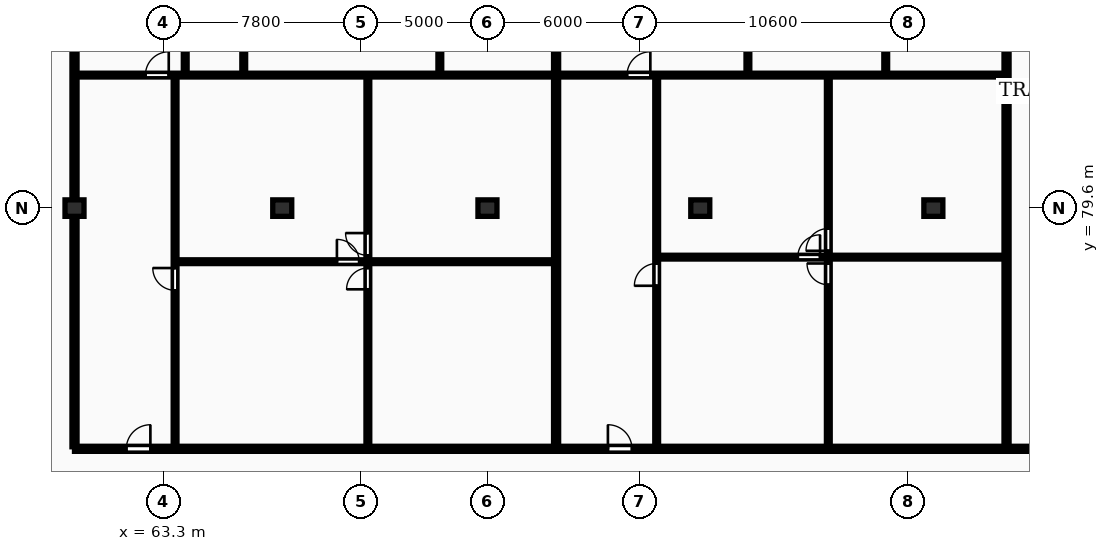
"""IFC4 building model, lengths in metres.
Left out: names, types, materials, properties, quantities, classifications, styles, units other than length and angle.
Written with IfcOpenShell. Run it as: python <this file> out.ifc"""

import sys

from ifc_helpers import new_model, si_unit, direction, frame, frame_2d, origin, origin_2d, place, context, subcontext, project, spatial, rectangle, extrude, element, fill, save


model = new_model("IFC4")
c1 = context("Model", 3, precision=1e-05, world=origin(), true_north=direction((0.0, 1.0)))
c2 = subcontext(c1, "Body", "Model", "MODEL_VIEW")
j1 = project(units=[si_unit("LENGTHUNIT", "METRE"), si_unit("PLANEANGLEUNIT", "RADIAN")], contexts=[c1])
p1 = place(None, origin())
s1 = spatial("IfcSite", under=j1, at=p1, CompositionType="ELEMENT")
p2 = place(p1, origin())
s2 = spatial("IfcBuilding", under=s1, at=p2, CompositionType="ELEMENT")
p3 = place(p2, frame((0.0, 0.0, 249.35)))
s3 = spatial("IfcBuildingStorey", under=s2, at=p3, CompositionType="ELEMENT", Elevation=249.35)
for number, where, z_axis, x_axis in (
    (1, (59.8, 79.6, 0.0), (0.0, 0.0, 1.0), (1.0, 0.0, 0.0)),
    (2, (68.0, 79.6, 0.0), (0.0, 0.0, 1.0), (1.0, 0.0, 0.0)),
    (3, (76.1, 79.6, 0.0), (0.0, 0.0, 1.0), (1.0, 0.0, 0.0)),
    (4, (84.5, 79.6, 0.0), (0.0, 0.0, 1.0), (1.0, 0.0, 0.0)),
    (5, (93.7, 79.6, 0.0), (0.0, 0.0, 1.0), (1.0, 0.0, 0.0)),
):
    element("IfcColumn", number, at=place(p3, frame(where, z_axis=z_axis, x_axis=x_axis)), inside=s3, PredefinedType="COLUMN", context=c2, shape_type="SweptSolid", body=[
        extrude(rectangle(XDim=0.75, YDim=0.65, at=origin_2d()), origin(), (0.0, 0.0, 1.0), 3.45),
    ])
p4 = place(p3, frame((59.8, 70.18, 0.0), z_axis=(0.0, 0.0, 1.0), x_axis=(0.0, 1.0, 0.0)))
e6 = element("IfcWall", 6, at=p4, inside=s3, PredefinedType="PARTITIONING", context=c2, shape_type="SweptSolid", body=[
    extrude(rectangle(XDim=24.32, YDim=0.2, at=frame_2d((12.16, 0.0))), origin(), (0.0, 0.0, 1.0), 2.477),
])
p5 = place(p3, frame((78.809, 70.18, 0.0), z_axis=(0.0, 0.0, 1.0), x_axis=(0.0, 1.0, 0.0)))
e7 = element("IfcWall", 7, at=p5, inside=s3, PredefinedType="PARTITIONING", context=c2, shape_type="SweptSolid", body=[
    extrude(rectangle(XDim=24.32, YDim=0.2, at=frame_2d((12.16, 0.0))), origin(), (0.0, 0.0, 1.0), 3.17),
])
p6 = place(p3, frame((71.379, 70.16, 0.0), z_axis=(0.0, 0.0, 1.0), x_axis=(0.0, 1.0, 0.0)))
e8 = element("IfcWall", 8, at=p6, inside=s3, PredefinedType="PARTITIONING", context=c2, shape_type="SweptSolid", body=[
    extrude(rectangle(XDim=14.65, YDim=0.15, at=frame_2d((7.325, 0.0))), origin(), (0.0, 0.0, 1.0), 3.17),
])
p7 = place(p6, frame((6.235, 0.0, 0.0)))
e9 = element("IfcOpeningElement", 9, at=p7, cuts=e8, PredefinedType="OPENING", context=c2, shape_type="SweptSolid", body=[
    extrude(rectangle(XDim=0.84, YDim=2.04, at=frame_2d((0.42, 1.02))), frame((0.0, 0.085, 0.0), z_axis=(0.0, -1.0, 0.0), x_axis=(1.0, 0.0, 0.0)), (0.0, 0.0, 1.0), 0.17),
])
p8 = place(p6, frame((7.575, 0.0, 0.0)))
e10 = element("IfcOpeningElement", 10, at=p8, cuts=e8, PredefinedType="OPENING", context=c2, shape_type="SweptSolid", body=[
    extrude(rectangle(XDim=0.88, YDim=2.06, at=frame_2d((0.44, 1.03))), frame((0.0, 0.085, 0.0), z_axis=(0.0, -1.0, 0.0), x_axis=(1.0, 0.0, 0.0)), (0.0, 0.0, 1.0), 0.17),
])
p9 = place(p3, frame((63.83, 77.485, 0.0), z_axis=(0.0, 0.0, 1.0), x_axis=(1.0, 0.0, 0.0)))
e11 = element("IfcWall", 11, at=p9, inside=s3, PredefinedType="PARTITIONING", context=c2, shape_type="SweptSolid", body=[
    extrude(rectangle(XDim=14.899, YDim=0.15, at=frame_2d((7.449, 0.0))), origin(), (0.0, 0.0, 1.0), 3.17),
])
p10 = place(p9, frame((6.327, 0.0, 0.0)))
e12 = element("IfcOpeningElement", 12, at=p10, cuts=e11, PredefinedType="OPENING", context=c2, shape_type="SweptSolid", body=[
    extrude(rectangle(XDim=0.88, YDim=2.06, at=frame_2d((0.44, 1.03))), frame((0.0, 0.085, 0.0), z_axis=(0.0, -1.0, 0.0), x_axis=(1.0, 0.0, 0.0)), (0.0, 0.0, 1.0), 0.17),
])
p11 = place(p3, frame((63.77, 70.16, 0.0), z_axis=(0.0, 0.0, 1.0), x_axis=(0.0, 1.0, 0.0)))
e13 = element("IfcWall", 13, at=p11, inside=s3, PredefinedType="PARTITIONING", context=c2, shape_type="SweptSolid", body=[
    extrude(rectangle(XDim=14.65, YDim=0.15, at=frame_2d((7.325, 0.0))), origin(), (0.0, 0.0, 1.0), 3.17),
])
p12 = place(p11, frame((6.195, 0.0, 0.0)))
e14 = element("IfcOpeningElement", 14, at=p12, cuts=e13, PredefinedType="OPENING", context=c2, shape_type="SweptSolid", body=[
    extrude(rectangle(XDim=0.88, YDim=2.06, at=frame_2d((0.44, 1.03))), frame((0.0, 0.085, 0.0), z_axis=(0.0, -1.0, 0.0), x_axis=(1.0, 0.0, 0.0)), (0.0, 0.0, 1.0), 0.17),
])
p13 = place(p3, frame((66.48, 84.89, 0.0), z_axis=(0.0, 0.0, 1.0), x_axis=(0.0, 1.0, 0.0)))
e15 = element("IfcWall", 15, at=p13, inside=s3, PredefinedType="PARTITIONING", context=c2, shape_type="SweptSolid", body=[
    extrude(rectangle(XDim=2.58, YDim=0.15, at=frame_2d((1.29, 0.0))), origin(), (0.0, 0.0, 1.0), 3.17),
])
p14 = place(p3, frame((64.17, 84.89, 0.0), z_axis=(0.0, 0.0, 1.0), x_axis=(0.0, 1.0, 0.0)))
e16 = element("IfcWall", 16, at=p14, inside=s3, PredefinedType="PARTITIONING", context=c2, shape_type="SweptSolid", body=[
    extrude(rectangle(XDim=9.61, YDim=0.15, at=frame_2d((4.805, 0.0))), origin(), (0.0, 0.0, 1.0), 3.17),
])
p15 = place(p14, frame((3.82, 0.0, 0.0)))
e17 = element("IfcOpeningElement", 17, at=p15, cuts=e16, PredefinedType="OPENING", context=c2, shape_type="SweptSolid", body=[
    extrude(rectangle(XDim=0.92, YDim=2.08, at=frame_2d((0.46, 1.04))), frame((0.0, 0.085, 0.0), z_axis=(0.0, -1.0, 0.0), x_axis=(1.0, 0.0, 0.0)), (0.0, 0.0, 1.0), 0.17),
])
p16 = place(p3, frame((74.22, 84.89, 0.0), z_axis=(0.0, 0.0, 1.0), x_axis=(0.0, 1.0, 0.0)))
e18 = element("IfcWall", 18, at=p16, inside=s3, PredefinedType="PARTITIONING", context=c2, shape_type="SweptSolid", body=[
    extrude(rectangle(XDim=2.58, YDim=0.15, at=frame_2d((1.29, 0.0))), origin(), (0.0, 0.0, 1.0), 3.17),
])
p17 = place(p3, frame((59.88, 84.85, 0.0), z_axis=(0.0, 0.0, 1.0), x_axis=(1.0, 0.0, 0.0)))
e19 = element("IfcWall", 19, at=p17, inside=s3, PredefinedType="PARTITIONING", context=c2, shape_type="SweptSolid", body=[
    extrude(rectangle(XDim=18.849, YDim=0.15, at=frame_2d((9.425, 0.0))), origin(), (0.0, 0.0, 1.0), 3.17),
])
p18 = place(p17, frame((2.72, 0.0, 0.0)))
e20 = element("IfcOpeningElement", 20, at=p18, cuts=e19, PredefinedType="OPENING", context=c2, shape_type="SweptSolid", body=[
    extrude(rectangle(XDim=0.92, YDim=2.08, at=frame_2d((0.46, 1.04))), frame((0.0, 0.085, 0.0), z_axis=(0.0, -1.0, 0.0), x_axis=(1.0, 0.0, 0.0)), (0.0, 0.0, 1.0), 0.17),
])
p19 = place(p3, frame((96.589, 70.18, 0.0), z_axis=(0.0, 0.0, 1.0), x_axis=(0.0, 1.0, 0.0)))
e21 = element("IfcWall", 21, at=p19, inside=s3, PredefinedType="PARTITIONING", context=c2, shape_type="SweptSolid", body=[
    extrude(rectangle(XDim=24.32, YDim=0.2, at=frame_2d((12.16, 0.0))), origin(), (0.0, 0.0, 1.0), 3.17),
])
p20 = place(p3, frame((89.554, 70.16, 0.0), z_axis=(0.0, 0.0, 1.0), x_axis=(0.0, 1.0, 0.0)))
e22 = element("IfcWall", 22, at=p20, inside=s3, PredefinedType="PARTITIONING", context=c2, shape_type="SweptSolid", body=[
    extrude(rectangle(XDim=14.65, YDim=0.15, at=frame_2d((7.325, 0.0))), origin(), (0.0, 0.0, 1.0), 3.17),
])
p21 = place(p20, frame((6.415, 0.0, 0.0)))
e23 = element("IfcOpeningElement", 23, at=p21, cuts=e22, PredefinedType="OPENING", context=c2, shape_type="SweptSolid", body=[
    extrude(rectangle(XDim=0.84, YDim=2.04, at=frame_2d((0.42, 1.02))), frame((0.0, 0.085, 0.0), z_axis=(0.0, -1.0, 0.0), x_axis=(1.0, 0.0, 0.0)), (0.0, 0.0, 1.0), 0.17),
])
p22 = place(p20, frame((7.755, 0.0, 0.0)))
e24 = element("IfcOpeningElement", 24, at=p22, cuts=e22, PredefinedType="OPENING", context=c2, shape_type="SweptSolid", body=[
    extrude(rectangle(XDim=0.88, YDim=2.06, at=frame_2d((0.44, 1.03))), frame((0.0, 0.085, 0.0), z_axis=(0.0, -1.0, 0.0), x_axis=(1.0, 0.0, 0.0)), (0.0, 0.0, 1.0), 0.17),
])
p23 = place(p3, frame((82.839, 77.665, 0.0), z_axis=(0.0, 0.0, 1.0), x_axis=(1.0, 0.0, 0.0)))
e25 = element("IfcWall", 25, at=p23, inside=s3, PredefinedType="PARTITIONING", context=c2, shape_type="SweptSolid", body=[
    extrude(rectangle(XDim=13.669, YDim=0.15, at=frame_2d((6.835, 0.0))), origin(), (0.0, 0.0, 1.0), 3.17),
])
p24 = place(p23, frame((5.51, 0.0, 0.0)))
e26 = element("IfcOpeningElement", 26, at=p24, cuts=e25, PredefinedType="OPENING", context=c2, shape_type="SweptSolid", body=[
    extrude(rectangle(XDim=0.88, YDim=2.06, at=frame_2d((0.44, 1.03))), frame((0.0, 0.085, 0.0), z_axis=(0.0, -1.0, 0.0), x_axis=(1.0, 0.0, 0.0)), (0.0, 0.0, 1.0), 0.17),
])
p25 = place(p3, frame((82.779, 70.16, 0.0), z_axis=(0.0, 0.0, 1.0), x_axis=(0.0, 1.0, 0.0)))
e27 = element("IfcWall", 27, at=p25, inside=s3, PredefinedType="PARTITIONING", context=c2, shape_type="SweptSolid", body=[
    extrude(rectangle(XDim=14.65, YDim=0.15, at=frame_2d((7.325, 0.0))), origin(), (0.0, 0.0, 1.0), 3.17),
])
p26 = place(p25, frame((6.375, 0.0, 0.0)))
e28 = element("IfcOpeningElement", 28, at=p26, cuts=e27, PredefinedType="OPENING", context=c2, shape_type="SweptSolid", body=[
    extrude(rectangle(XDim=0.88, YDim=2.06, at=frame_2d((0.44, 1.03))), frame((0.0, 0.085, 0.0), z_axis=(0.0, -1.0, 0.0), x_axis=(1.0, 0.0, 0.0)), (0.0, 0.0, 1.0), 0.17),
])
p27 = place(p3, frame((86.38, 84.89, 0.0), z_axis=(0.0, 0.0, 1.0), x_axis=(0.0, 1.0, 0.0)))
e29 = element("IfcWall", 29, at=p27, inside=s3, PredefinedType="PARTITIONING", context=c2, shape_type="SweptSolid", body=[
    extrude(rectangle(XDim=9.61, YDim=0.15, at=frame_2d((4.805, 0.0))), origin(), (0.0, 0.0, 1.0), 3.17),
])
p28 = place(p27, frame((3.82, 0.0, 0.0)))
e30 = element("IfcOpeningElement", 30, at=p28, cuts=e29, PredefinedType="OPENING", context=c2, shape_type="SweptSolid", body=[
    extrude(rectangle(XDim=0.92, YDim=2.08, at=frame_2d((0.46, 1.04))), frame((0.0, 0.085, 0.0), z_axis=(0.0, -1.0, 0.0), x_axis=(1.0, 0.0, 0.0)), (0.0, 0.0, 1.0), 0.17),
])
p29 = place(p3, frame((91.82, 84.89, 0.0), z_axis=(0.0, 0.0, 1.0), x_axis=(0.0, 1.0, 0.0)))
e31 = element("IfcWall", 31, at=p29, inside=s3, PredefinedType="PARTITIONING", context=c2, shape_type="SweptSolid", body=[
    extrude(rectangle(XDim=2.47, YDim=0.15, at=frame_2d((1.235, 0.0))), origin(), (0.0, 0.0, 1.0), 3.17),
])
p30 = place(p3, frame((78.889, 84.85, 0.0), z_axis=(0.0, 0.0, 1.0), x_axis=(1.0, 0.0, 0.0)))
e32 = element("IfcWall", 32, at=p30, inside=s3, PredefinedType="PARTITIONING", context=c2, shape_type="SweptSolid", body=[
    extrude(rectangle(XDim=17.619, YDim=0.15, at=frame_2d((8.81, 0.0))), origin(), (0.0, 0.0, 1.0), 3.17),
])
p31 = place(p30, frame((2.72, 0.0, 0.0)))
e33 = element("IfcOpeningElement", 33, at=p31, cuts=e32, PredefinedType="OPENING", context=c2, shape_type="SweptSolid", body=[
    extrude(rectangle(XDim=0.92, YDim=2.08, at=frame_2d((0.46, 1.04))), frame((0.0, 0.085, 0.0), z_axis=(0.0, -1.0, 0.0), x_axis=(1.0, 0.0, 0.0)), (0.0, 0.0, 1.0), 0.17),
])
p32 = place(p3, frame((59.8, 70.1, 0.0), z_axis=(0.0, 0.0, 1.0), x_axis=(1.0, 0.0, 0.0)))
e34 = element("IfcWall", 34, at=p32, inside=s3, PredefinedType="PARTITIONING", context=c2, shape_type="SweptSolid", body=[
    extrude(rectangle(XDim=68.6, YDim=0.2, at=frame_2d((34.3, 0.0))), origin(), (0.0, 0.0, 1.0), 3.17),
])
p33 = place(p32, frame((2.045, 0.0, 0.0)))
e35 = element("IfcOpeningElement", 35, at=p33, cuts=e34, PredefinedType="OPENING", context=c2, shape_type="SweptSolid", body=[
    extrude(rectangle(XDim=0.95, YDim=2.15, at=frame_2d((0.475, 1.075))), frame((0.0, 0.11, 0.0), z_axis=(0.0, -1.0, 0.0), x_axis=(1.0, 0.0, 0.0)), (0.0, 0.0, 1.0), 0.22),
])
p34 = place(p32, frame((21.054, 0.0, 0.0)))
e36 = element("IfcOpeningElement", 36, at=p34, cuts=e34, PredefinedType="OPENING", context=c2, shape_type="SweptSolid", body=[
    extrude(rectangle(XDim=0.95, YDim=2.15, at=frame_2d((0.475, 1.075))), frame((0.0, 0.11, 0.0), z_axis=(0.0, -1.0, 0.0), x_axis=(1.0, 0.0, 0.0)), (0.0, 0.0, 1.0), 0.22),
])
p35 = place(p32, frame((43.434, 0.0, 0.0)))
e37 = element("IfcOpeningElement", 37, at=p35, cuts=e34, PredefinedType="OPENING", context=c2, shape_type="SweptSolid", body=[
    extrude(rectangle(XDim=1.22, YDim=2.18, at=frame_2d((0.61, 1.09))), frame((0.0, 0.11, 0.0), z_axis=(0.0, -1.0, 0.0), x_axis=(1.0, 0.0, 0.0)), (0.0, 0.0, 1.0), 0.22),
])
p36 = place(p32, frame((59.455, 0.0, 0.0)))
e38 = element("IfcOpeningElement", 38, at=p36, cuts=e34, PredefinedType="OPENING", context=c2, shape_type="SweptSolid", body=[
    extrude(rectangle(XDim=1.22, YDim=2.18, at=frame_2d((0.61, 1.09))), frame((0.0, 0.11, 0.0), z_axis=(0.0, -1.0, 0.0), x_axis=(1.0, 0.0, 0.0)), (0.0, 0.0, 1.0), 0.22),
])
p37 = place(p7, origin())
e39 = element("IfcDoor", 39, at=p37, inside=s3, OperationType="SINGLE_SWING_LEFT", PredefinedType="DOOR", context=c2, shape_type="SweptSolid", body=[
    extrude(rectangle(XDim=0.84, YDim=2.04, at=frame_2d((0.42, 1.02))), frame((0.0, 0.025, 0.0), z_axis=(0.0, -1.0, 0.0), x_axis=(1.0, 0.0, 0.0)), (0.0, 0.0, 1.0), 0.05),
])
fill(e9, e39)
p38 = place(p8, origin())
e40 = element("IfcDoor", 40, at=p38, inside=s3, OperationType="SINGLE_SWING_RIGHT", PredefinedType="DOOR", context=c2, shape_type="SweptSolid", body=[
    extrude(rectangle(XDim=0.88, YDim=2.06, at=frame_2d((0.44, 1.03))), frame((0.0, 0.025, 0.0), z_axis=(0.0, -1.0, 0.0), x_axis=(1.0, 0.0, 0.0)), (0.0, 0.0, 1.0), 0.05),
])
fill(e10, e40)
p39 = place(p10, origin())
e41 = element("IfcDoor", 41, at=p39, inside=s3, OperationType="SINGLE_SWING_LEFT", PredefinedType="DOOR", context=c2, shape_type="SweptSolid", body=[
    extrude(rectangle(XDim=0.88, YDim=2.06, at=frame_2d((0.44, 1.03))), frame((0.0, 0.025, 0.0), z_axis=(0.0, -1.0, 0.0), x_axis=(1.0, 0.0, 0.0)), (0.0, 0.0, 1.0), 0.05),
])
fill(e12, e41)
p40 = place(p12, origin())
e42 = element("IfcDoor", 42, at=p40, inside=s3, OperationType="SINGLE_SWING_RIGHT", PredefinedType="DOOR", context=c2, shape_type="SweptSolid", body=[
    extrude(rectangle(XDim=0.88, YDim=2.06, at=frame_2d((0.44, 1.03))), frame((0.0, 0.025, 0.0), z_axis=(0.0, -1.0, 0.0), x_axis=(1.0, 0.0, 0.0)), (0.0, 0.0, 1.0), 0.05),
])
fill(e14, e42)
p41 = place(p18, origin())
e43 = element("IfcDoor", 43, at=p41, inside=s3, OperationType="SINGLE_SWING_RIGHT", PredefinedType="DOOR", context=c2, shape_type="SweptSolid", body=[
    extrude(rectangle(XDim=0.92, YDim=2.08, at=frame_2d((0.46, 1.04))), frame((0.0, 0.025, 0.0), z_axis=(0.0, -1.0, 0.0), x_axis=(1.0, 0.0, 0.0)), (0.0, 0.0, 1.0), 0.05),
])
fill(e20, e43)
p42 = place(p21, origin())
e44 = element("IfcDoor", 44, at=p42, inside=s3, OperationType="SINGLE_SWING_RIGHT", PredefinedType="DOOR", context=c2, shape_type="SweptSolid", body=[
    extrude(rectangle(XDim=0.84, YDim=2.04, at=frame_2d((0.42, 1.02))), frame((0.0, 0.025, 0.0), z_axis=(0.0, -1.0, 0.0), x_axis=(1.0, 0.0, 0.0)), (0.0, 0.0, 1.0), 0.05),
])
fill(e23, e44)
p43 = place(p22, origin())
e45 = element("IfcDoor", 45, at=p43, inside=s3, OperationType="SINGLE_SWING_LEFT", PredefinedType="DOOR", context=c2, shape_type="SweptSolid", body=[
    extrude(rectangle(XDim=0.88, YDim=2.06, at=frame_2d((0.44, 1.03))), frame((0.0, 0.025, 0.0), z_axis=(0.0, -1.0, 0.0), x_axis=(1.0, 0.0, 0.0)), (0.0, 0.0, 1.0), 0.05),
])
fill(e24, e45)
p44 = place(p24, origin())
e46 = element("IfcDoor", 46, at=p44, inside=s3, OperationType="SINGLE_SWING_RIGHT", PredefinedType="DOOR", context=c2, shape_type="SweptSolid", body=[
    extrude(rectangle(XDim=0.88, YDim=2.06, at=frame_2d((0.44, 1.03))), frame((0.0, 0.025, 0.0), z_axis=(0.0, -1.0, 0.0), x_axis=(1.0, 0.0, 0.0)), (0.0, 0.0, 1.0), 0.05),
])
fill(e26, e46)
p45 = place(p26, origin())
e47 = element("IfcDoor", 47, at=p45, inside=s3, OperationType="SINGLE_SWING_LEFT", PredefinedType="DOOR", context=c2, shape_type="SweptSolid", body=[
    extrude(rectangle(XDim=0.88, YDim=2.06, at=frame_2d((0.44, 1.03))), frame((0.0, 0.025, 0.0), z_axis=(0.0, -1.0, 0.0), x_axis=(1.0, 0.0, 0.0)), (0.0, 0.0, 1.0), 0.05),
])
fill(e28, e47)
p46 = place(p31, origin())
e48 = element("IfcDoor", 48, at=p46, inside=s3, OperationType="SINGLE_SWING_RIGHT", PredefinedType="DOOR", context=c2, shape_type="SweptSolid", body=[
    extrude(rectangle(XDim=0.92, YDim=2.08, at=frame_2d((0.46, 1.04))), frame((0.0, 0.025, 0.0), z_axis=(0.0, -1.0, 0.0), x_axis=(1.0, 0.0, 0.0)), (0.0, 0.0, 1.0), 0.05),
])
fill(e33, e48)
p47 = place(p33, origin())
e49 = element("IfcDoor", 49, at=p47, inside=s3, OperationType="SINGLE_SWING_RIGHT", PredefinedType="DOOR", context=c2, shape_type="SweptSolid", body=[
    extrude(rectangle(XDim=0.95, YDim=2.15, at=frame_2d((0.475, 1.075))), frame((0.0, 0.025, 0.0), z_axis=(0.0, -1.0, 0.0), x_axis=(1.0, 0.0, 0.0)), (0.0, 0.0, 1.0), 0.05),
])
fill(e35, e49)
p48 = place(p34, origin())
e50 = element("IfcDoor", 50, at=p48, inside=s3, OperationType="SINGLE_SWING_LEFT", PredefinedType="DOOR", context=c2, shape_type="SweptSolid", body=[
    extrude(rectangle(XDim=0.95, YDim=2.15, at=frame_2d((0.475, 1.075))), frame((0.0, 0.025, 0.0), z_axis=(0.0, -1.0, 0.0), x_axis=(1.0, 0.0, 0.0)), (0.0, 0.0, 1.0), 0.05),
])
fill(e36, e50)
save(model, sys.argv[1])
